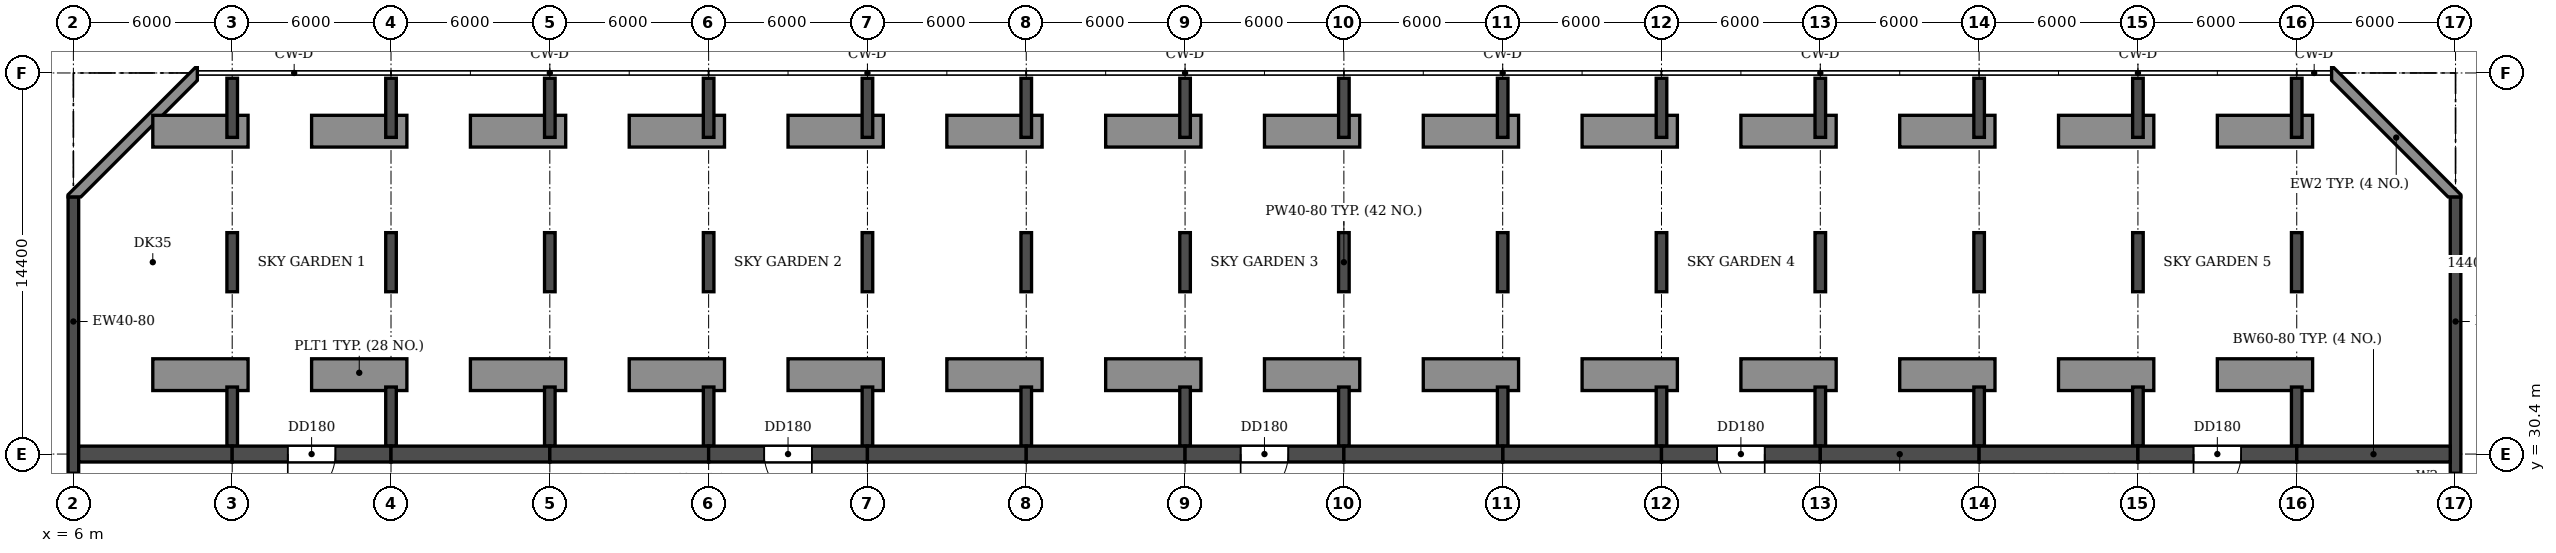
"""IFC4 building model, lengths in metres.
Left out: names, types, materials, properties, quantities, classifications, styles, units other than length and angle.
Written with IfcOpenShell. Run it as: python <this file> out.ifc"""

import sys

from ifc_helpers import new_model, si_unit, direction, frame, frame_2d, origin, place, context, subcontext, project, spatial, polyline, rectangle, outline, extrude, source, transform, mapped, element, fill, save


model = new_model("IFC4")
c1 = context("Model", 3, precision=1e-05, world=origin(), true_north=direction((0.0, 1.0)))
c2 = subcontext(c1, "Body", "Model", "MODEL_VIEW")
j1 = project(units=[si_unit("LENGTHUNIT", "METRE"), si_unit("PLANEANGLEUNIT", "RADIAN")], contexts=[c1])
p1 = place(None, origin())
s1 = spatial("IfcSite", under=j1, at=p1, CompositionType="ELEMENT")
p2 = place(p1, origin())
s2 = spatial("IfcBuilding", under=s1, at=p2, CompositionType="ELEMENT")
p3 = place(p2, frame((0.0, 0.0, 66.3)))
s3 = spatial("IfcBuildingStorey", under=s2, at=p3, CompositionType="ELEMENT", Elevation=66.3)
for number, where, z_axis, x_axis in (
    (1, (12.0, 30.7, 0.0), (0.0, 0.0, 1.0), (0.0, 1.0, 0.0)),
    (2, (12.0, 36.533, 0.0), (0.0, 0.0, 1.0), (0.0, 1.0, 0.0)),
    (3, (12.0, 42.367, 0.0), (0.0, 0.0, 1.0), (0.0, 1.0, 0.0)),
    (4, (18.0, 30.7, 0.0), (0.0, 0.0, 1.0), (0.0, 1.0, 0.0)),
    (5, (18.0, 36.533, 0.0), (0.0, 0.0, 1.0), (0.0, 1.0, 0.0)),
    (6, (18.0, 42.367, 0.0), (0.0, 0.0, 1.0), (0.0, 1.0, 0.0)),
    (7, (24.0, 30.7, 0.0), (0.0, 0.0, 1.0), (0.0, 1.0, 0.0)),
    (8, (24.0, 36.533, 0.0), (0.0, 0.0, 1.0), (0.0, 1.0, 0.0)),
    (9, (24.0, 42.367, 0.0), (0.0, 0.0, 1.0), (0.0, 1.0, 0.0)),
    (10, (30.0, 30.7, 0.0), (0.0, 0.0, 1.0), (0.0, 1.0, 0.0)),
    (11, (30.0, 36.533, 0.0), (0.0, 0.0, 1.0), (0.0, 1.0, 0.0)),
    (12, (30.0, 42.367, 0.0), (0.0, 0.0, 1.0), (0.0, 1.0, 0.0)),
    (13, (36.0, 30.7, 0.0), (0.0, 0.0, 1.0), (0.0, 1.0, 0.0)),
    (14, (36.0, 36.533, 0.0), (0.0, 0.0, 1.0), (0.0, 1.0, 0.0)),
    (15, (36.0, 42.367, 0.0), (0.0, 0.0, 1.0), (0.0, 1.0, 0.0)),
    (16, (42.0, 30.7, 0.0), (0.0, 0.0, 1.0), (0.0, 1.0, 0.0)),
    (17, (42.0, 36.533, 0.0), (0.0, 0.0, 1.0), (0.0, 1.0, 0.0)),
    (18, (42.0, 42.367, 0.0), (0.0, 0.0, 1.0), (0.0, 1.0, 0.0)),
    (19, (48.0, 30.7, 0.0), (0.0, 0.0, 1.0), (0.0, 1.0, 0.0)),
    (20, (48.0, 36.533, 0.0), (0.0, 0.0, 1.0), (0.0, 1.0, 0.0)),
    (21, (48.0, 42.367, 0.0), (0.0, 0.0, 1.0), (0.0, 1.0, 0.0)),
    (22, (54.0, 30.7, 0.0), (0.0, 0.0, 1.0), (0.0, 1.0, 0.0)),
    (23, (54.0, 36.533, 0.0), (0.0, 0.0, 1.0), (0.0, 1.0, 0.0)),
    (24, (54.0, 42.367, 0.0), (0.0, 0.0, 1.0), (0.0, 1.0, 0.0)),
    (25, (60.0, 30.7, 0.0), (0.0, 0.0, 1.0), (0.0, 1.0, 0.0)),
    (26, (60.0, 36.533, 0.0), (0.0, 0.0, 1.0), (0.0, 1.0, 0.0)),
    (27, (60.0, 42.367, 0.0), (0.0, 0.0, 1.0), (0.0, 1.0, 0.0)),
    (28, (66.0, 30.7, 0.0), (0.0, 0.0, 1.0), (0.0, 1.0, 0.0)),
    (29, (66.0, 36.533, 0.0), (0.0, 0.0, 1.0), (0.0, 1.0, 0.0)),
    (30, (66.0, 42.367, 0.0), (0.0, 0.0, 1.0), (0.0, 1.0, 0.0)),
    (31, (72.0, 30.7, 0.0), (0.0, 0.0, 1.0), (0.0, 1.0, 0.0)),
    (32, (72.0, 36.533, 0.0), (0.0, 0.0, 1.0), (0.0, 1.0, 0.0)),
    (33, (72.0, 42.367, 0.0), (0.0, 0.0, 1.0), (0.0, 1.0, 0.0)),
    (34, (78.0, 30.7, 0.0), (0.0, 0.0, 1.0), (0.0, 1.0, 0.0)),
    (35, (78.0, 36.533, 0.0), (0.0, 0.0, 1.0), (0.0, 1.0, 0.0)),
    (36, (78.0, 42.367, 0.0), (0.0, 0.0, 1.0), (0.0, 1.0, 0.0)),
    (37, (84.0, 30.7, 0.0), (0.0, 0.0, 1.0), (0.0, 1.0, 0.0)),
    (38, (84.0, 36.533, 0.0), (0.0, 0.0, 1.0), (0.0, 1.0, 0.0)),
    (39, (84.0, 42.367, 0.0), (0.0, 0.0, 1.0), (0.0, 1.0, 0.0)),
    (40, (90.0, 30.7, 0.0), (0.0, 0.0, 1.0), (0.0, 1.0, 0.0)),
    (41, (90.0, 36.533, 0.0), (0.0, 0.0, 1.0), (0.0, 1.0, 0.0)),
    (42, (90.0, 42.367, 0.0), (0.0, 0.0, 1.0), (0.0, 1.0, 0.0)),
):
    element("IfcWall", number, at=place(p3, frame(where, z_axis=z_axis, x_axis=x_axis)), inside=s3, PredefinedType="SHEAR", context=c2, shape_type="SweptSolid", body=[
        extrude(rectangle(XDim=2.233, YDim=0.4, at=frame_2d((1.117, 0.0))), origin(), (0.0, 0.0, 1.0), 6.36),
    ])
p4 = place(p3, frame((6.0, 4.683, 0.0), z_axis=(0.0, 0.0, 1.0), x_axis=(0.0, 1.0, 0.0)))
e43 = element("IfcWall", 43, at=p4, inside=s3, PredefinedType="SHEAR", context=c2, shape_type="SweptSolid", body=[
    extrude(rectangle(XDim=35.434, YDim=0.4, at=frame_2d((17.717, 0.0))), origin(), (0.0, 0.0, 1.0), 6.36),
])
p5 = place(p4, frame((23.817, 0.0, 0.9)))
e44 = element("IfcOpeningElement", 44, at=p5, cuts=e43, PredefinedType="OPENING", context=c2, shape_type="SweptSolid", body=[
    extrude(rectangle(XDim=1.2, YDim=1.5, at=frame_2d((0.6, 0.75))), frame((0.0, 0.21, 0.0), z_axis=(0.0, -1.0, 0.0), x_axis=(1.0, 0.0, 0.0)), (0.0, 0.0, 1.0), 0.42),
])
p6 = place(p4, frame((8.017, 0.0, 0.9)))
e45 = element("IfcOpeningElement", 45, at=p6, cuts=e43, PredefinedType="OPENING", context=c2, shape_type="SweptSolid", body=[
    extrude(rectangle(XDim=1.2, YDim=1.5, at=frame_2d((0.6, 0.75))), frame((0.0, 0.21, 0.0), z_axis=(0.0, -1.0, 0.0), x_axis=(1.0, 0.0, 0.0)), (0.0, 0.0, 1.0), 0.42),
])
p7 = place(p4, frame((13.317, 0.0, 0.9)))
e46 = element("IfcOpeningElement", 46, at=p7, cuts=e43, PredefinedType="OPENING", context=c2, shape_type="SweptSolid", body=[
    extrude(rectangle(XDim=1.2, YDim=1.5, at=frame_2d((0.6, 0.75))), frame((0.0, 0.21, 0.0), z_axis=(0.0, -1.0, 0.0), x_axis=(1.0, 0.0, 0.0)), (0.0, 0.0, 1.0), 0.42),
])
p8 = place(p3, frame((96.0, 4.683, 0.0), z_axis=(0.0, 0.0, 1.0), x_axis=(0.0, 1.0, 0.0)))
e47 = element("IfcWall", 47, at=p8, inside=s3, PredefinedType="SHEAR", context=c2, shape_type="SweptSolid", body=[
    extrude(rectangle(XDim=35.434, YDim=0.4, at=frame_2d((17.717, 0.0))), origin(), (0.0, 0.0, 1.0), 6.36),
])
p9 = place(p8, frame((23.817, 0.0, 0.9)))
e48 = element("IfcOpeningElement", 48, at=p9, cuts=e47, PredefinedType="OPENING", context=c2, shape_type="SweptSolid", body=[
    extrude(rectangle(XDim=1.2, YDim=1.5, at=frame_2d((0.6, 0.75))), frame((0.0, 0.21, 0.0), z_axis=(0.0, -1.0, 0.0), x_axis=(1.0, 0.0, 0.0)), (0.0, 0.0, 1.0), 0.42),
])
p10 = place(p8, frame((8.017, 0.0, 0.9)))
e49 = element("IfcOpeningElement", 49, at=p10, cuts=e47, PredefinedType="OPENING", context=c2, shape_type="SweptSolid", body=[
    extrude(rectangle(XDim=1.2, YDim=1.5, at=frame_2d((0.6, 0.75))), frame((0.0, 0.21, 0.0), z_axis=(0.0, -1.0, 0.0), x_axis=(1.0, 0.0, 0.0)), (0.0, 0.0, 1.0), 0.42),
])
p11 = place(p8, frame((13.317, 0.0, 0.9)))
e50 = element("IfcOpeningElement", 50, at=p11, cuts=e47, PredefinedType="OPENING", context=c2, shape_type="SweptSolid", body=[
    extrude(rectangle(XDim=1.2, YDim=1.5, at=frame_2d((0.6, 0.75))), frame((0.0, 0.21, 0.0), z_axis=(0.0, -1.0, 0.0), x_axis=(1.0, 0.0, 0.0)), (0.0, 0.0, 1.0), 0.42),
])
p12 = place(p3, frame((6.2, 30.4, 0.0), z_axis=(0.0, 0.0, 1.0), x_axis=(1.0, 0.0, 0.0)))
e51 = element("IfcWall", 51, at=p12, inside=s3, PredefinedType="SHEAR", context=c2, shape_type="SweptSolid", body=[
    extrude(rectangle(XDim=5.8, YDim=0.6, at=frame_2d((2.9, 0.0))), origin(), (0.0, 0.0, 1.0), 6.36),
])
p13 = place(p3, frame((12.0, 30.4, 0.0), z_axis=(0.0, 0.0, 1.0), x_axis=(1.0, 0.0, 0.0)))
e52 = element("IfcWall", 52, at=p13, inside=s3, PredefinedType="SHEAR", context=c2, shape_type="SweptSolid", body=[
    extrude(rectangle(XDim=6.0, YDim=0.6, at=frame_2d((3.0, 0.0))), origin(), (0.0, 0.0, 1.0), 6.36),
])
p14 = place(p13, frame((2.1, 0.0, 0.0)))
e53 = element("IfcOpeningElement", 53, at=p14, cuts=e52, PredefinedType="OPENING", context=c2, shape_type="SweptSolid", body=[
    extrude(rectangle(XDim=1.8, YDim=2.1, at=frame_2d((0.9, 1.05))), frame((0.0, 0.31, 0.0), z_axis=(0.0, -1.0, 0.0), x_axis=(1.0, 0.0, 0.0)), (0.0, 0.0, 1.0), 0.62),
])
for number, where, z_axis, x_axis in (
    (54, (18.0, 30.4, 0.0), (0.0, 0.0, 1.0), (1.0, 0.0, 0.0)),
    (55, (24.0, 30.4, 0.0), (0.0, 0.0, 1.0), (1.0, 0.0, 0.0)),
):
    element("IfcWall", number, at=place(p3, frame(where, z_axis=z_axis, x_axis=x_axis)), inside=s3, PredefinedType="SHEAR", context=c2, shape_type="SweptSolid", body=[
        extrude(rectangle(XDim=6.0, YDim=0.6, at=frame_2d((3.0, 0.0))), origin(), (0.0, 0.0, 1.0), 6.36),
    ])
p15 = place(p3, frame((30.0, 30.4, 0.0), z_axis=(0.0, 0.0, 1.0), x_axis=(1.0, 0.0, 0.0)))
e56 = element("IfcWall", 56, at=p15, inside=s3, PredefinedType="SHEAR", context=c2, shape_type="SweptSolid", body=[
    extrude(rectangle(XDim=6.0, YDim=0.6, at=frame_2d((3.0, 0.0))), origin(), (0.0, 0.0, 1.0), 6.36),
])
p16 = place(p15, frame((2.1, 0.0, 0.0)))
e57 = element("IfcOpeningElement", 57, at=p16, cuts=e56, PredefinedType="OPENING", context=c2, shape_type="SweptSolid", body=[
    extrude(rectangle(XDim=1.8, YDim=2.1, at=frame_2d((0.9, 1.05))), frame((0.0, 0.31, 0.0), z_axis=(0.0, -1.0, 0.0), x_axis=(1.0, 0.0, 0.0)), (0.0, 0.0, 1.0), 0.62),
])
for number, where, z_axis, x_axis in (
    (58, (36.0, 30.4, 0.0), (0.0, 0.0, 1.0), (1.0, 0.0, 0.0)),
    (59, (42.0, 30.4, 0.0), (0.0, 0.0, 1.0), (1.0, 0.0, 0.0)),
):
    element("IfcWall", number, at=place(p3, frame(where, z_axis=z_axis, x_axis=x_axis)), inside=s3, PredefinedType="SHEAR", context=c2, shape_type="SweptSolid", body=[
        extrude(rectangle(XDim=6.0, YDim=0.6, at=frame_2d((3.0, 0.0))), origin(), (0.0, 0.0, 1.0), 6.36),
    ])
p17 = place(p3, frame((48.0, 30.4, 0.0), z_axis=(0.0, 0.0, 1.0), x_axis=(1.0, 0.0, 0.0)))
e60 = element("IfcWall", 60, at=p17, inside=s3, PredefinedType="SHEAR", context=c2, shape_type="SweptSolid", body=[
    extrude(rectangle(XDim=6.0, YDim=0.6, at=frame_2d((3.0, 0.0))), origin(), (0.0, 0.0, 1.0), 6.36),
])
p18 = place(p17, frame((2.1, 0.0, 0.0)))
e61 = element("IfcOpeningElement", 61, at=p18, cuts=e60, PredefinedType="OPENING", context=c2, shape_type="SweptSolid", body=[
    extrude(rectangle(XDim=1.8, YDim=2.1, at=frame_2d((0.9, 1.05))), frame((0.0, 0.31, 0.0), z_axis=(0.0, -1.0, 0.0), x_axis=(1.0, 0.0, 0.0)), (0.0, 0.0, 1.0), 0.62),
])
for number, where, z_axis, x_axis in (
    (62, (54.0, 30.4, 0.0), (0.0, 0.0, 1.0), (1.0, 0.0, 0.0)),
    (63, (60.0, 30.4, 0.0), (0.0, 0.0, 1.0), (1.0, 0.0, 0.0)),
):
    element("IfcWall", number, at=place(p3, frame(where, z_axis=z_axis, x_axis=x_axis)), inside=s3, PredefinedType="SHEAR", context=c2, shape_type="SweptSolid", body=[
        extrude(rectangle(XDim=6.0, YDim=0.6, at=frame_2d((3.0, 0.0))), origin(), (0.0, 0.0, 1.0), 6.36),
    ])
p19 = place(p3, frame((66.0, 30.4, 0.0), z_axis=(0.0, 0.0, 1.0), x_axis=(1.0, 0.0, 0.0)))
e64 = element("IfcWall", 64, at=p19, inside=s3, PredefinedType="SHEAR", context=c2, shape_type="SweptSolid", body=[
    extrude(rectangle(XDim=6.0, YDim=0.6, at=frame_2d((3.0, 0.0))), origin(), (0.0, 0.0, 1.0), 6.36),
])
p20 = place(p19, frame((2.1, 0.0, 0.0)))
e65 = element("IfcOpeningElement", 65, at=p20, cuts=e64, PredefinedType="OPENING", context=c2, shape_type="SweptSolid", body=[
    extrude(rectangle(XDim=1.8, YDim=2.1, at=frame_2d((0.9, 1.05))), frame((0.0, 0.31, 0.0), z_axis=(0.0, -1.0, 0.0), x_axis=(1.0, 0.0, 0.0)), (0.0, 0.0, 1.0), 0.62),
])
for number, where, z_axis, x_axis in (
    (66, (72.0, 30.4, 0.0), (0.0, 0.0, 1.0), (1.0, 0.0, 0.0)),
    (67, (78.0, 30.4, 0.0), (0.0, 0.0, 1.0), (1.0, 0.0, 0.0)),
):
    element("IfcWall", number, at=place(p3, frame(where, z_axis=z_axis, x_axis=x_axis)), inside=s3, PredefinedType="SHEAR", context=c2, shape_type="SweptSolid", body=[
        extrude(rectangle(XDim=6.0, YDim=0.6, at=frame_2d((3.0, 0.0))), origin(), (0.0, 0.0, 1.0), 6.36),
    ])
p21 = place(p3, frame((84.0, 30.4, 0.0), z_axis=(0.0, 0.0, 1.0), x_axis=(1.0, 0.0, 0.0)))
e68 = element("IfcWall", 68, at=p21, inside=s3, PredefinedType="SHEAR", context=c2, shape_type="SweptSolid", body=[
    extrude(rectangle(XDim=6.0, YDim=0.6, at=frame_2d((3.0, 0.0))), origin(), (0.0, 0.0, 1.0), 6.36),
])
p22 = place(p21, frame((2.1, 0.0, 0.0)))
e69 = element("IfcOpeningElement", 69, at=p22, cuts=e68, PredefinedType="OPENING", context=c2, shape_type="SweptSolid", body=[
    extrude(rectangle(XDim=1.8, YDim=2.1, at=frame_2d((0.9, 1.05))), frame((0.0, 0.31, 0.0), z_axis=(0.0, -1.0, 0.0), x_axis=(1.0, 0.0, 0.0)), (0.0, 0.0, 1.0), 0.62),
])
p23 = place(p3, frame((90.0, 30.4, 0.0), z_axis=(0.0, 0.0, 1.0), x_axis=(1.0, 0.0, 0.0)))
e70 = element("IfcWall", 70, at=p23, inside=s3, PredefinedType="SHEAR", context=c2, shape_type="SweptSolid", body=[
    extrude(rectangle(XDim=5.8, YDim=0.6, at=frame_2d((2.9, 0.0))), origin(), (0.0, 0.0, 1.0), 6.36),
])
p24 = place(p3, origin())
e71 = element("IfcWall", 71, at=p24, inside=s3, PredefinedType="STANDARD", context=c2, shape_type="SweptSolid", body=[
    extrude(outline(polyline([(96.2, 40.117), (96.2, 40.2), (91.4, 45.0), (91.317, 45.0), (91.317, 44.517), (95.717, 40.117), (96.2, 40.117)])), origin(), (0.0, 0.0, 1.0), 6.36),
])
p25 = place(p3, origin())
e72 = element("IfcWall", 72, at=p25, inside=s3, PredefinedType="STANDARD", context=c2, shape_type="SweptSolid", body=[
    extrude(outline(polyline([(10.683, 45.0), (10.6, 45.0), (5.8, 40.2), (5.8, 40.117), (6.283, 40.117), (10.683, 44.517), (10.683, 45.0)])), origin(), (0.0, 0.0, 1.0), 6.36),
])
m1 = source(origin(), c2, "Body", "SweptSolid", [
    extrude(outline(polyline([(0.0, 0.0), (3.6, 0.0), (3.6, 1.2), (0.0, 1.2), (0.0, 0.0)])), origin(), (0.0, 0.0, 1.0), 0.6),
])
for number, where in (
    (73, (9.0, 32.8, 0.0)),
    (74, (15.0, 32.8, 0.0)),
    (75, (21.0, 32.8, 0.0)),
    (76, (27.0, 32.8, 0.0)),
    (77, (33.0, 32.8, 0.0)),
    (78, (39.0, 32.8, 0.0)),
    (79, (45.0, 32.8, 0.0)),
    (80, (51.0, 32.8, 0.0)),
    (81, (57.0, 32.8, 0.0)),
    (82, (63.0, 32.8, 0.0)),
    (83, (69.0, 32.8, 0.0)),
    (84, (75.0, 32.8, 0.0)),
    (85, (81.0, 32.8, 0.0)),
    (86, (87.0, 32.8, 0.0)),
    (87, (9.0, 42.0, 0.0)),
    (88, (15.0, 42.0, 0.0)),
    (89, (21.0, 42.0, 0.0)),
    (90, (27.0, 42.0, 0.0)),
    (91, (33.0, 42.0, 0.0)),
    (92, (39.0, 42.0, 0.0)),
    (93, (45.0, 42.0, 0.0)),
    (94, (51.0, 42.0, 0.0)),
    (95, (57.0, 42.0, 0.0)),
    (96, (63.0, 42.0, 0.0)),
    (97, (69.0, 42.0, 0.0)),
    (98, (75.0, 42.0, 0.0)),
    (99, (81.0, 42.0, 0.0)),
    (100, (87.0, 42.0, 0.0)),
):
    element("IfcWall", number, at=place(p3, frame(where)), inside=s3, PredefinedType="USERDEFINED", context=c2, shape_type="MappedRepresentation", body=[
        mapped(m1, transform((0.0, 0.0, 0.0))),
    ])
p26 = place(p9, origin())
e101 = element("IfcWindow", 101, at=p26, inside=s3, PartitioningType="SINGLE_PANEL", PredefinedType="WINDOW", context=c2, shape_type="SweptSolid", body=[
    extrude(rectangle(XDim=1.2, YDim=1.5, at=frame_2d((0.6, 0.75))), frame((0.0, 0.03, 0.0), z_axis=(0.0, -1.0, 0.0), x_axis=(1.0, 0.0, 0.0)), (0.0, 0.0, 1.0), 0.06),
])
fill(e48, e101)
p27 = place(p5, origin())
e102 = element("IfcWindow", 102, at=p27, inside=s3, PartitioningType="SINGLE_PANEL", PredefinedType="WINDOW", context=c2, shape_type="SweptSolid", body=[
    extrude(rectangle(XDim=1.2, YDim=1.5, at=frame_2d((0.6, 0.75))), frame((0.0, 0.03, 0.0), z_axis=(0.0, -1.0, 0.0), x_axis=(1.0, 0.0, 0.0)), (0.0, 0.0, 1.0), 0.06),
])
fill(e44, e102)
p28 = place(p14, frame((1.8, 0.0, 0.0), z_axis=(0.0, 0.0, 1.0), x_axis=(-1.0, 0.0, 0.0)))
e103 = element("IfcDoor", 103, at=p28, inside=s3, OperationType="DOUBLE_DOOR_SINGLE_SWING", PredefinedType="DOOR", context=c2, shape_type="SweptSolid", body=[
    extrude(rectangle(XDim=1.8, YDim=2.1, at=frame_2d((0.9, 1.05))), frame((0.0, 0.025, 0.0), z_axis=(0.0, -1.0, 0.0), x_axis=(1.0, 0.0, 0.0)), (0.0, 0.0, 1.0), 0.05),
])
fill(e53, e103)
p29 = place(p16, frame((1.8, 0.0, 0.0), z_axis=(0.0, 0.0, 1.0), x_axis=(-1.0, 0.0, 0.0)))
e104 = element("IfcDoor", 104, at=p29, inside=s3, OperationType="DOUBLE_DOOR_SINGLE_SWING", PredefinedType="DOOR", context=c2, shape_type="SweptSolid", body=[
    extrude(rectangle(XDim=1.8, YDim=2.1, at=frame_2d((0.9, 1.05))), frame((0.0, 0.025, 0.0), z_axis=(0.0, -1.0, 0.0), x_axis=(1.0, 0.0, 0.0)), (0.0, 0.0, 1.0), 0.05),
])
fill(e57, e104)
p30 = place(p18, frame((1.8, 0.0, 0.0), z_axis=(0.0, 0.0, 1.0), x_axis=(-1.0, 0.0, 0.0)))
e105 = element("IfcDoor", 105, at=p30, inside=s3, OperationType="DOUBLE_DOOR_SINGLE_SWING", PredefinedType="DOOR", context=c2, shape_type="SweptSolid", body=[
    extrude(rectangle(XDim=1.8, YDim=2.1, at=frame_2d((0.9, 1.05))), frame((0.0, 0.025, 0.0), z_axis=(0.0, -1.0, 0.0), x_axis=(1.0, 0.0, 0.0)), (0.0, 0.0, 1.0), 0.05),
])
fill(e61, e105)
p31 = place(p20, frame((1.8, 0.0, 0.0), z_axis=(0.0, 0.0, 1.0), x_axis=(-1.0, 0.0, 0.0)))
e106 = element("IfcDoor", 106, at=p31, inside=s3, OperationType="DOUBLE_DOOR_SINGLE_SWING", PredefinedType="DOOR", context=c2, shape_type="SweptSolid", body=[
    extrude(rectangle(XDim=1.8, YDim=2.1, at=frame_2d((0.9, 1.05))), frame((0.0, 0.025, 0.0), z_axis=(0.0, -1.0, 0.0), x_axis=(1.0, 0.0, 0.0)), (0.0, 0.0, 1.0), 0.05),
])
fill(e65, e106)
p32 = place(p22, frame((1.8, 0.0, 0.0), z_axis=(0.0, 0.0, 1.0), x_axis=(-1.0, 0.0, 0.0)))
e107 = element("IfcDoor", 107, at=p32, inside=s3, OperationType="DOUBLE_DOOR_SINGLE_SWING", PredefinedType="DOOR", context=c2, shape_type="SweptSolid", body=[
    extrude(rectangle(XDim=1.8, YDim=2.1, at=frame_2d((0.9, 1.05))), frame((0.0, 0.025, 0.0), z_axis=(0.0, -1.0, 0.0), x_axis=(1.0, 0.0, 0.0)), (0.0, 0.0, 1.0), 0.05),
])
fill(e69, e107)
save(model, sys.argv[1])
